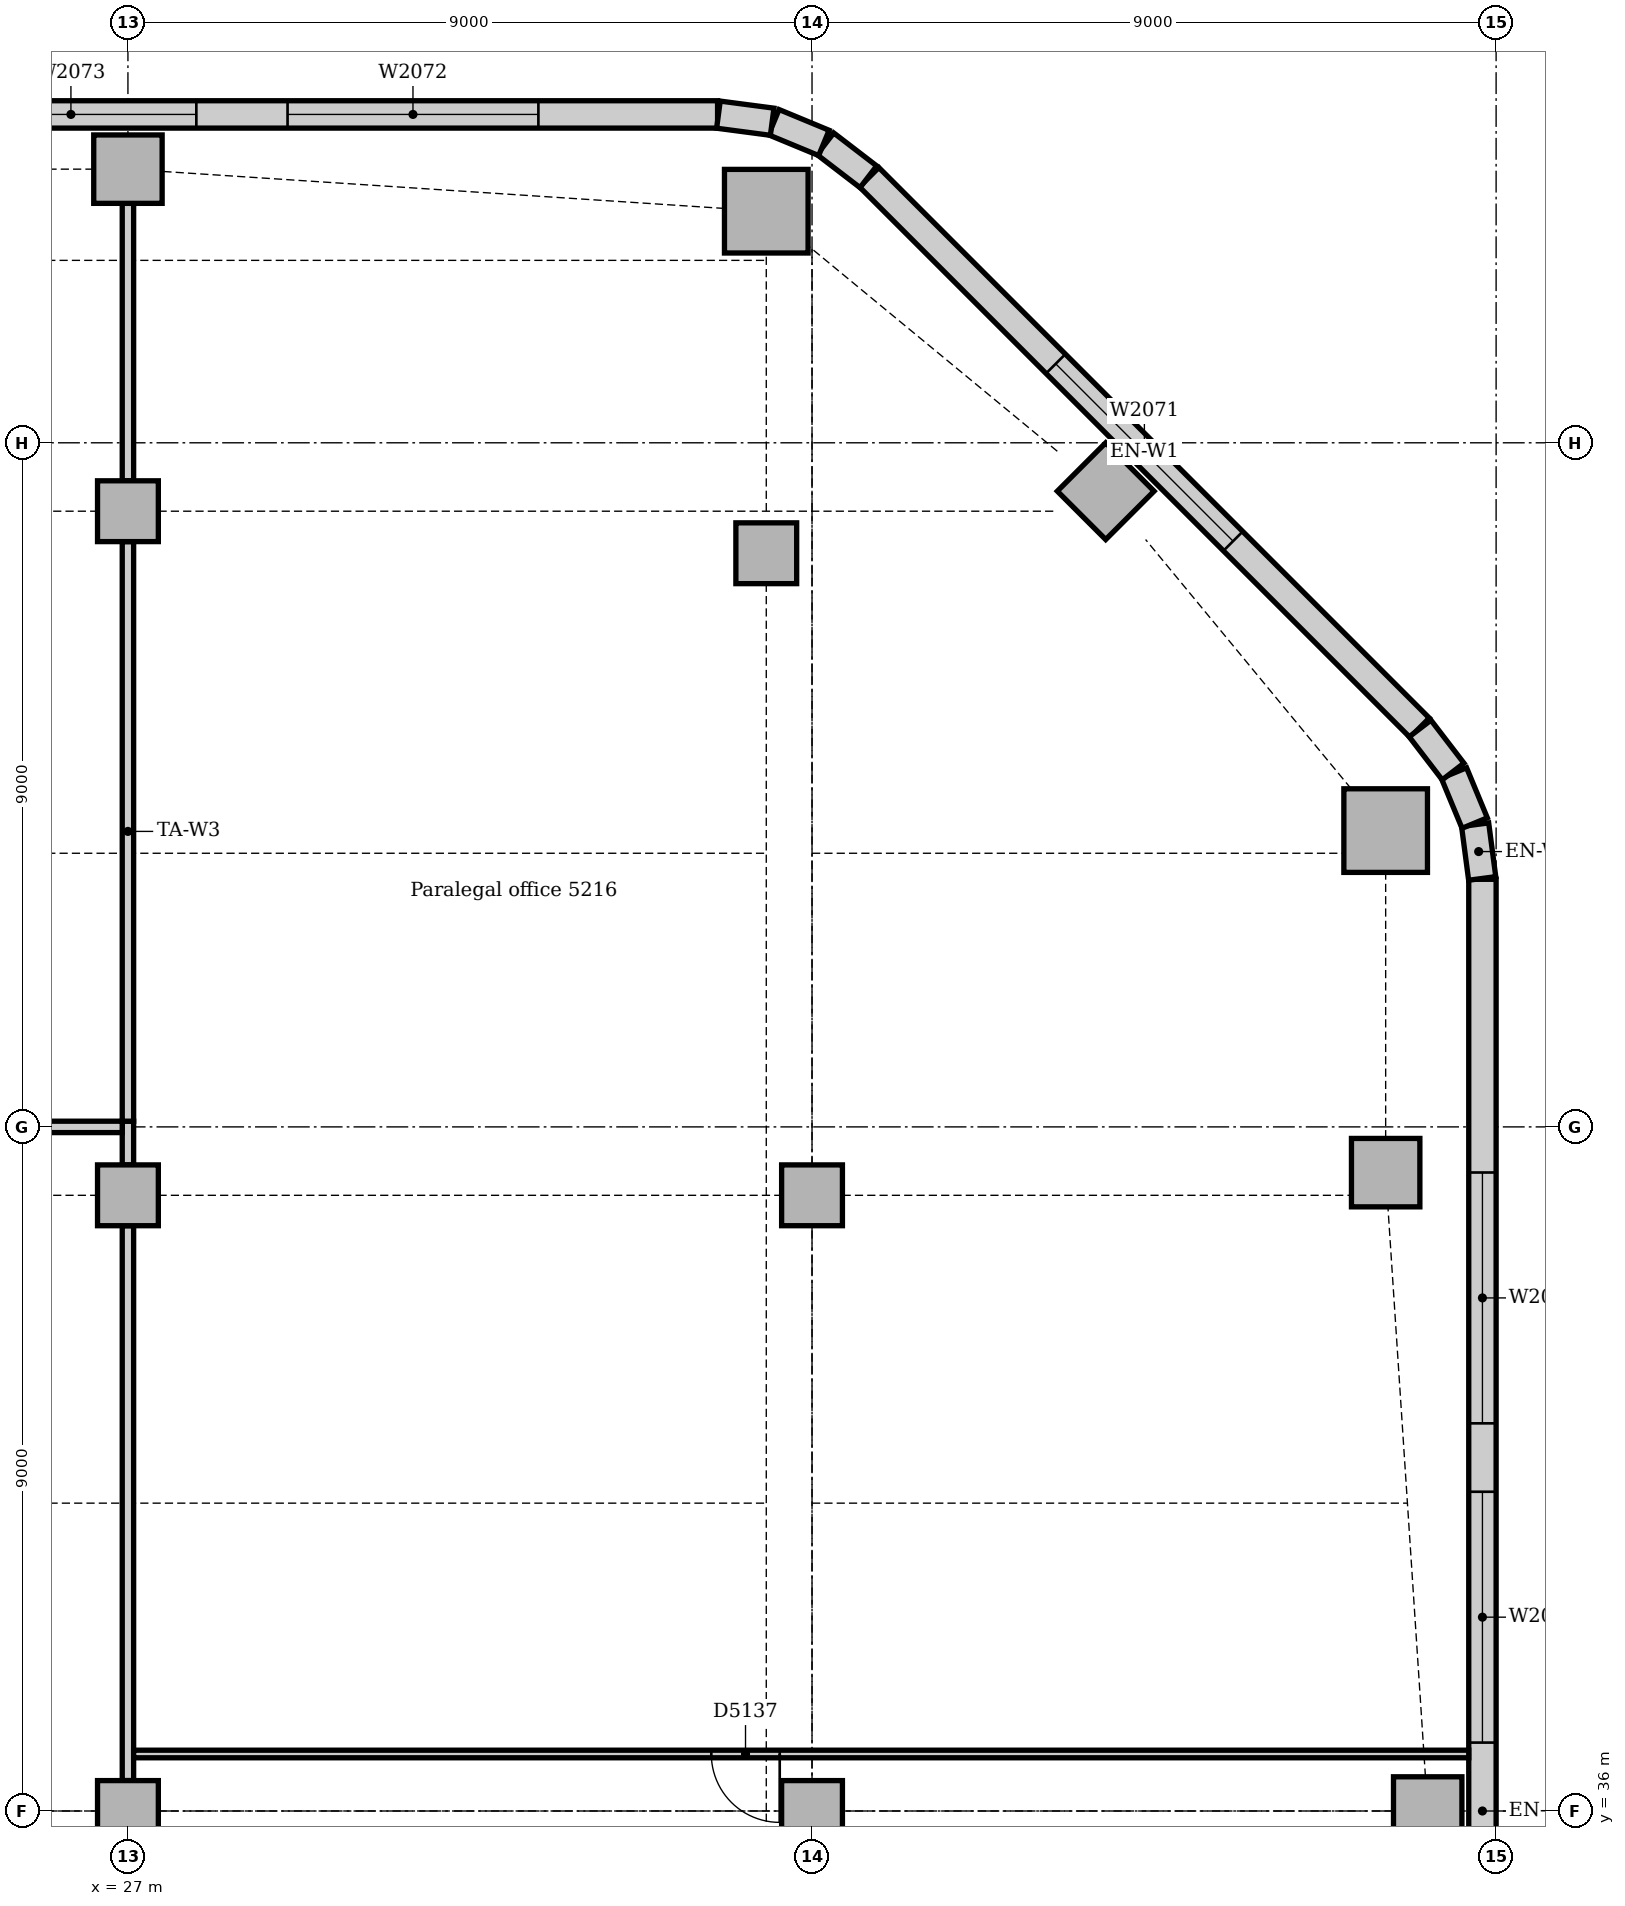
"""IFC4 building model, lengths in metres.
Left out: names, types, materials, properties, quantities, classifications, styles, units other than length and angle.
Written with IfcOpenShell. Run it as: python <this file> out.ifc"""

import sys

from ifc_helpers import new_model, si_unit, direction, frame, frame_2d, origin, origin_2d, place, context, subcontext, project, spatial, rectangle, extrude, element, fill, save


model = new_model("IFC4")
c1 = context("Model", 3, precision=1e-05, world=origin(), true_north=direction((0.0, 1.0)))
c2 = subcontext(c1, "Body", "Model", "MODEL_VIEW")
j1 = project(units=[si_unit("LENGTHUNIT", "METRE"), si_unit("PLANEANGLEUNIT", "RADIAN")], contexts=[c1])
p1 = place(None, origin())
s1 = spatial("IfcSite", under=j1, at=p1, CompositionType="ELEMENT")
p2 = place(p1, origin())
s2 = spatial("IfcBuilding", under=s1, at=p2, CompositionType="ELEMENT")
p3 = place(p2, frame((0.0, 0.0, 218.0)))
s3 = spatial("IfcBuildingStorey", under=s2, at=p3, CompositionType="ELEMENT", Elevation=218.0)
for number, where, z_axis, x_axis in (
    (1, (43.547, 48.898, 0.0), (0.0, 0.0, 1.0), (1.0, 0.0, 0.0)),
    (2, (35.398, 57.047, 0.0), (0.0, 0.0, 1.0), (1.0, 0.0, 0.0)),
):
    element("IfcColumn", number, at=place(p3, frame(where, z_axis=z_axis, x_axis=x_axis)), inside=s3, PredefinedType="COLUMN", context=c2, shape_type="SweptSolid", body=[
        extrude(rectangle(XDim=1.1, YDim=1.1, at=origin_2d()), origin(), (0.0, 0.0, 1.0), 3.85),
    ])
for number, where, z_axis, x_axis in (
    (3, (44.1, 36.0, 0.0), (0.0, 0.0, 1.0), (1.0, 0.0, 0.0)),
    (4, (43.547, 44.398, 0.0), (0.0, 0.0, 1.0), (1.0, 0.0, 0.0)),
    (5, (39.864, 53.364, 0.0), (0.0, 0.0, 1.0), (0.707, 0.707, 0.0)),
    (6, (27.0, 57.6, 0.0), (0.0, 0.0, 1.0), (1.0, 0.0, 0.0)),
):
    element("IfcColumn", number, at=place(p3, frame(where, z_axis=z_axis, x_axis=x_axis)), inside=s3, PredefinedType="COLUMN", context=c2, shape_type="SweptSolid", body=[
        extrude(rectangle(XDim=0.9, YDim=0.9, at=origin_2d()), origin(), (0.0, 0.0, 1.0), 3.85),
    ])
for number, where, z_axis, x_axis in (
    (7, (27.0, 36.0, 0.0), (0.0, 0.0, 1.0), (1.0, 0.0, 0.0)),
    (8, (27.0, 44.1, 0.0), (0.0, 0.0, 1.0), (1.0, 0.0, 0.0)),
    (9, (27.0, 53.1, 0.0), (0.0, 0.0, 1.0), (1.0, 0.0, 0.0)),
    (10, (36.0, 36.0, 0.0), (0.0, 0.0, 1.0), (1.0, 0.0, 0.0)),
    (11, (36.0, 44.1, 0.0), (0.0, 0.0, 1.0), (1.0, 0.0, 0.0)),
    (12, (35.398, 52.547, 0.0), (0.0, 0.0, 1.0), (1.0, 0.0, 0.0)),
):
    element("IfcColumn", number, at=place(p3, frame(where, z_axis=z_axis, x_axis=x_axis)), inside=s3, PredefinedType="COLUMN", context=c2, shape_type="SweptSolid", body=[
        extrude(rectangle(XDim=0.8, YDim=0.8, at=origin_2d()), origin(), (0.0, 0.0, 1.0), 3.85),
    ])
p4 = place(p3, frame((44.82, 23.743, 0.0), z_axis=(0.0, 0.0, 1.0), x_axis=(0.0, 1.0, 0.0)))
e13 = element("IfcWall", 13, at=p4, inside=s3, PredefinedType="STANDARD", context=c2, shape_type="SweptSolid", body=[
    extrude(rectangle(XDim=24.515, YDim=0.36, at=frame_2d((12.257, 0.0))), origin(), (0.0, 0.0, 1.0), 3.85),
])
p5 = place(p4, frame((3.857, 0.0, 0.9)))
e14 = element("IfcOpeningElement", 14, at=p5, cuts=e13, PredefinedType="OPENING", context=c2, shape_type="SweptSolid", body=[
    extrude(rectangle(XDim=3.3, YDim=1.6, at=frame_2d((1.65, 0.8))), frame((0.0, 0.19, 0.0), z_axis=(0.0, -1.0, 0.0), x_axis=(1.0, 0.0, 0.0)), (0.0, 0.0, 1.0), 0.38),
])
p6 = place(p4, frame((8.357, 0.0, 0.9)))
e15 = element("IfcOpeningElement", 15, at=p6, cuts=e13, PredefinedType="OPENING", context=c2, shape_type="SweptSolid", body=[
    extrude(rectangle(XDim=3.3, YDim=1.6, at=frame_2d((1.65, 0.8))), frame((0.0, 0.19, 0.0), z_axis=(0.0, -1.0, 0.0), x_axis=(1.0, 0.0, 0.0)), (0.0, 0.0, 1.0), 0.38),
])
p7 = place(p4, frame((13.157, 0.0, 0.9)))
e16 = element("IfcOpeningElement", 16, at=p7, cuts=e13, PredefinedType="OPENING", context=c2, shape_type="SweptSolid", body=[
    extrude(rectangle(XDim=3.3, YDim=1.6, at=frame_2d((1.65, 0.8))), frame((0.0, 0.19, 0.0), z_axis=(0.0, -1.0, 0.0), x_axis=(1.0, 0.0, 0.0)), (0.0, 0.0, 1.0), 0.38),
])
p8 = place(p4, frame((17.357, 0.0, 0.9)))
e17 = element("IfcOpeningElement", 17, at=p8, cuts=e13, PredefinedType="OPENING", context=c2, shape_type="SweptSolid", body=[
    extrude(rectangle(XDim=3.3, YDim=1.6, at=frame_2d((1.65, 0.8))), frame((0.0, 0.19, 0.0), z_axis=(0.0, -1.0, 0.0), x_axis=(1.0, 0.0, 0.0)), (0.0, 0.0, 1.0), 0.38),
])
p9 = place(p3, frame((43.994, 50.251, 0.0), z_axis=(0.0, 0.0, 1.0), x_axis=(-0.707106781187, 0.707106781187, 0.0)))
e18 = element("IfcWall", 18, at=p9, inside=s3, PredefinedType="STANDARD", context=c2, shape_type="SweptSolid", body=[
    extrude(rectangle(XDim=10.243, YDim=0.36, at=frame_2d((5.121, 0.0))), origin(), (0.0, 0.0, 1.0), 3.85),
])
p10 = place(p9, frame((3.471, 0.0, 0.9)))
e19 = element("IfcOpeningElement", 19, at=p10, cuts=e18, PredefinedType="OPENING", context=c2, shape_type="SweptSolid", body=[
    extrude(rectangle(XDim=3.3, YDim=1.6, at=frame_2d((1.65, 0.8))), frame((0.0, 0.19, 0.0), z_axis=(0.0, -1.0, 0.0), x_axis=(1.0, 0.0, 0.0)), (0.0, 0.0, 1.0), 0.38),
])
p11 = place(p3, frame((34.757, 58.32, 0.0), z_axis=(0.0, 0.0, 1.0), x_axis=(-1.0, 0.0, 0.0)))
e20 = element("IfcWall", 20, at=p11, inside=s3, PredefinedType="STANDARD", context=c2, shape_type="SweptSolid", body=[
    extrude(rectangle(XDim=30.515, YDim=0.36, at=frame_2d((15.257, 0.0))), origin(), (0.0, 0.0, 1.0), 3.85),
])
p12 = place(p11, frame((2.357, 0.0, 0.9)))
e21 = element("IfcOpeningElement", 21, at=p12, cuts=e20, PredefinedType="OPENING", context=c2, shape_type="SweptSolid", body=[
    extrude(rectangle(XDim=3.3, YDim=1.6, at=frame_2d((1.65, 0.8))), frame((0.0, 0.19, 0.0), z_axis=(0.0, -1.0, 0.0), x_axis=(1.0, 0.0, 0.0)), (0.0, 0.0, 1.0), 0.38),
])
p13 = place(p11, frame((6.857, 0.0, 0.9)))
e22 = element("IfcOpeningElement", 22, at=p13, cuts=e20, PredefinedType="OPENING", context=c2, shape_type="SweptSolid", body=[
    extrude(rectangle(XDim=3.3, YDim=1.6, at=frame_2d((1.65, 0.8))), frame((0.0, 0.19, 0.0), z_axis=(0.0, -1.0, 0.0), x_axis=(1.0, 0.0, 0.0)), (0.0, 0.0, 1.0), 0.38),
])
p14 = place(p11, frame((11.357, 0.0, 0.9)))
e23 = element("IfcOpeningElement", 23, at=p14, cuts=e20, PredefinedType="OPENING", context=c2, shape_type="SweptSolid", body=[
    extrude(rectangle(XDim=3.3, YDim=1.6, at=frame_2d((1.65, 0.8))), frame((0.0, 0.19, 0.0), z_axis=(0.0, -1.0, 0.0), x_axis=(1.0, 0.0, 0.0)), (0.0, 0.0, 1.0), 0.38),
])
p15 = place(p11, frame((15.857, 0.0, 0.9)))
e24 = element("IfcOpeningElement", 24, at=p15, cuts=e20, PredefinedType="OPENING", context=c2, shape_type="SweptSolid", body=[
    extrude(rectangle(XDim=3.3, YDim=1.6, at=frame_2d((1.65, 0.8))), frame((0.0, 0.19, 0.0), z_axis=(0.0, -1.0, 0.0), x_axis=(1.0, 0.0, 0.0)), (0.0, 0.0, 1.0), 0.38),
])
p16 = place(p11, frame((20.357, 0.0, 0.9)))
e25 = element("IfcOpeningElement", 25, at=p16, cuts=e20, PredefinedType="OPENING", context=c2, shape_type="SweptSolid", body=[
    extrude(rectangle(XDim=3.3, YDim=1.6, at=frame_2d((1.65, 0.8))), frame((0.0, 0.19, 0.0), z_axis=(0.0, -1.0, 0.0), x_axis=(1.0, 0.0, 0.0)), (0.0, 0.0, 1.0), 0.38),
])
p17 = place(p11, frame((24.857, 0.0, 0.9)))
e26 = element("IfcOpeningElement", 26, at=p17, cuts=e20, PredefinedType="OPENING", context=c2, shape_type="SweptSolid", body=[
    extrude(rectangle(XDim=3.3, YDim=1.6, at=frame_2d((1.65, 0.8))), frame((0.0, 0.19, 0.0), z_axis=(0.0, -1.0, 0.0), x_axis=(1.0, 0.0, 0.0)), (0.0, 0.0, 1.0), 0.38),
])
for number, where, z_axis, x_axis in (
    (27, (44.817, 48.269, 0.0), (0.0, 0.0, 1.0), (-0.131, 0.991, 0.0)),
    (28, (44.718, 48.997, 0.0), (0.0, 0.0, 1.0), (-0.383, 0.924, 0.0)),
):
    element("IfcWall", number, at=place(p3, frame(where, z_axis=z_axis, x_axis=x_axis)), inside=s3, PredefinedType="STANDARD", context=c2, shape_type="SweptSolid", body=[
        extrude(rectangle(XDim=0.713, YDim=0.36, at=frame_2d((0.356, 0.0))), origin(), (0.0, 0.0, 1.0), 3.85),
    ])
for number, where, z_axis, x_axis in (
    (29, (44.434, 49.675, 0.0), (0.0, 0.0, 1.0), (-0.609, 0.793, 0.0)),
    (30, (36.741, 57.5, 0.0), (0.0, 0.0, 1.0), (-0.793, 0.609, 0.0)),
):
    element("IfcWall", number, at=place(p3, frame(where, z_axis=z_axis, x_axis=x_axis)), inside=s3, PredefinedType="STANDARD", context=c2, shape_type="SweptSolid", body=[
        extrude(rectangle(XDim=0.713, YDim=0.36, at=frame_2d((0.357, 0.0))), origin(), (0.0, 0.0, 1.0), 3.85),
    ])
for number, where, z_axis, x_axis in (
    (31, (36.156, 57.945, 0.0), (0.0, 0.0, 1.0), (-0.924, 0.383, 0.0)),
    (32, (35.476, 58.224, 0.0), (0.0, 0.0, 1.0), (-0.991, 0.131, 0.0)),
):
    element("IfcWall", number, at=place(p3, frame(where, z_axis=z_axis, x_axis=x_axis)), inside=s3, PredefinedType="STANDARD", context=c2, shape_type="SweptSolid", body=[
        extrude(rectangle(XDim=0.713, YDim=0.36, at=frame_2d((0.356, 0.0))), origin(), (0.0, 0.0, 1.0), 3.85),
    ])
p18 = place(p3, frame((27.0, 36.4, 0.0), z_axis=(0.0, 0.0, 1.0), x_axis=(0.0, 1.0, 0.0)))
e33 = element("IfcWall", 33, at=p18, inside=s3, PredefinedType="PARTITIONING", context=c2, shape_type="SweptSolid", body=[
    extrude(rectangle(XDim=7.3, YDim=0.15, at=frame_2d((3.65, 0.0))), origin(), (0.0, 0.0, 1.0), 3.35),
])
p19 = place(p3, frame((27.0, 44.5, 0.0), z_axis=(0.0, 0.0, 1.0), x_axis=(0.0, 1.0, 0.0)))
e34 = element("IfcWall", 34, at=p19, inside=s3, PredefinedType="PARTITIONING", context=c2, shape_type="SweptSolid", body=[
    extrude(rectangle(XDim=0.575, YDim=0.15, at=frame_2d((0.287, 0.0))), origin(), (0.0, 0.0, 1.0), 3.35),
])
p20 = place(p3, frame((22.425, 45.0, 0.0), z_axis=(0.0, 0.0, 1.0), x_axis=(1.0, 0.0, 0.0)))
e35 = element("IfcWall", 35, at=p20, inside=s3, PredefinedType="PARTITIONING", context=c2, shape_type="SweptSolid", body=[
    extrude(rectangle(XDim=4.5, YDim=0.15, at=frame_2d((2.25, 0.0))), origin(), (0.0, 0.0, 1.0), 3.85),
])
p21 = place(p20, frame((1.75, 0.0, 0.0)))
e36 = element("IfcOpeningElement", 36, at=p21, cuts=e35, PredefinedType="OPENING", context=c2, shape_type="SweptSolid", body=[
    extrude(rectangle(XDim=1.0, YDim=2.1, at=frame_2d((0.5, 1.05))), frame((0.0, 0.085, 0.0), z_axis=(0.0, -1.0, 0.0), x_axis=(1.0, 0.0, 0.0)), (0.0, 0.0, 1.0), 0.17),
])
p22 = place(p3, frame((27.0, 45.075, 0.0), z_axis=(0.0, 0.0, 1.0), x_axis=(0.0, 1.0, 0.0)))
e37 = element("IfcWall", 37, at=p22, inside=s3, PredefinedType="PARTITIONING", context=c2, shape_type="SweptSolid", body=[
    extrude(rectangle(XDim=7.625, YDim=0.15, at=frame_2d((3.812, 0.0))), origin(), (0.0, 0.0, 1.0), 3.35),
])
p23 = place(p3, frame((27.0, 53.5, 0.0), z_axis=(0.0, 0.0, 1.0), x_axis=(0.0, 1.0, 0.0)))
e38 = element("IfcWall", 38, at=p23, inside=s3, PredefinedType="PARTITIONING", context=c2, shape_type="SweptSolid", body=[
    extrude(rectangle(XDim=3.65, YDim=0.15, at=frame_2d((1.825, 0.0))), origin(), (0.0, 0.0, 1.0), 3.41),
])
p24 = place(p3, frame((27.075, 36.75, 0.0), z_axis=(0.0, 0.0, 1.0), x_axis=(1.0, 0.0, 0.0)))
e39 = element("IfcWall", 39, at=p24, inside=s3, PredefinedType="PARTITIONING", context=c2, shape_type="SweptSolid", body=[
    extrude(rectangle(XDim=17.565, YDim=0.1, at=frame_2d((8.783, 0.0))), origin(), (0.0, 0.0, 1.0), 3.85),
])
p25 = place(p24, frame((7.6, 0.0, 0.0)))
e40 = element("IfcOpeningElement", 40, at=p25, cuts=e39, PredefinedType="OPENING", context=c2, shape_type="SweptSolid", body=[
    extrude(rectangle(XDim=0.9, YDim=2.1, at=frame_2d((0.45, 1.05))), frame((0.0, 0.06, 0.0), z_axis=(0.0, -1.0, 0.0), x_axis=(1.0, 0.0, 0.0)), (0.0, 0.0, 1.0), 0.12),
])
p26 = place(p7, origin())
e41 = element("IfcWindow", 41, at=p26, inside=s3, PartitioningType="SINGLE_PANEL", PredefinedType="WINDOW", context=c2, shape_type="SweptSolid", body=[
    extrude(rectangle(XDim=3.3, YDim=1.6, at=frame_2d((1.65, 0.8))), frame((0.0, 0.13, 0.0), z_axis=(0.0, -1.0, 0.0), x_axis=(1.0, 0.0, 0.0)), (0.0, 0.0, 1.0), 0.06),
])
fill(e16, e41)
p27 = place(p8, origin())
e42 = element("IfcWindow", 42, at=p27, inside=s3, PartitioningType="SINGLE_PANEL", PredefinedType="WINDOW", context=c2, shape_type="SweptSolid", body=[
    extrude(rectangle(XDim=3.3, YDim=1.6, at=frame_2d((1.65, 0.8))), frame((0.0, 0.13, 0.0), z_axis=(0.0, -1.0, 0.0), x_axis=(1.0, 0.0, 0.0)), (0.0, 0.0, 1.0), 0.06),
])
fill(e17, e42)
p28 = place(p10, origin())
e43 = element("IfcWindow", 43, at=p28, inside=s3, PartitioningType="SINGLE_PANEL", PredefinedType="WINDOW", context=c2, shape_type="SweptSolid", body=[
    extrude(rectangle(XDim=3.3, YDim=1.6, at=frame_2d((1.65, 0.8))), frame((0.0, 0.13, 0.0), z_axis=(0.0, -1.0, 0.0), x_axis=(1.0, 0.0, 0.0)), (0.0, 0.0, 1.0), 0.06),
])
fill(e19, e43)
p29 = place(p12, origin())
e44 = element("IfcWindow", 44, at=p29, inside=s3, PartitioningType="SINGLE_PANEL", PredefinedType="WINDOW", context=c2, shape_type="SweptSolid", body=[
    extrude(rectangle(XDim=3.3, YDim=1.6, at=frame_2d((1.65, 0.8))), frame((0.0, 0.13, 0.0), z_axis=(0.0, -1.0, 0.0), x_axis=(1.0, 0.0, 0.0)), (0.0, 0.0, 1.0), 0.06),
])
fill(e21, e44)
p30 = place(p13, origin())
e45 = element("IfcWindow", 45, at=p30, inside=s3, PartitioningType="SINGLE_PANEL", PredefinedType="WINDOW", context=c2, shape_type="SweptSolid", body=[
    extrude(rectangle(XDim=3.3, YDim=1.6, at=frame_2d((1.65, 0.8))), frame((0.0, 0.13, 0.0), z_axis=(0.0, -1.0, 0.0), x_axis=(1.0, 0.0, 0.0)), (0.0, 0.0, 1.0), 0.06),
])
fill(e22, e45)
p31 = place(p25, frame((0.9, 0.0, 0.0), z_axis=(0.0, 0.0, 1.0), x_axis=(-1.0, 0.0, 0.0)))
e46 = element("IfcDoor", 46, at=p31, inside=s3, OperationType="SINGLE_SWING_LEFT", PredefinedType="DOOR", context=c2, shape_type="SweptSolid", body=[
    extrude(rectangle(XDim=0.9, YDim=2.1, at=frame_2d((0.45, 1.05))), frame((0.0, 0.025, 0.0), z_axis=(0.0, -1.0, 0.0), x_axis=(1.0, 0.0, 0.0)), (0.0, 0.0, 1.0), 0.05),
])
fill(e40, e46)
save(model, sys.argv[1])
